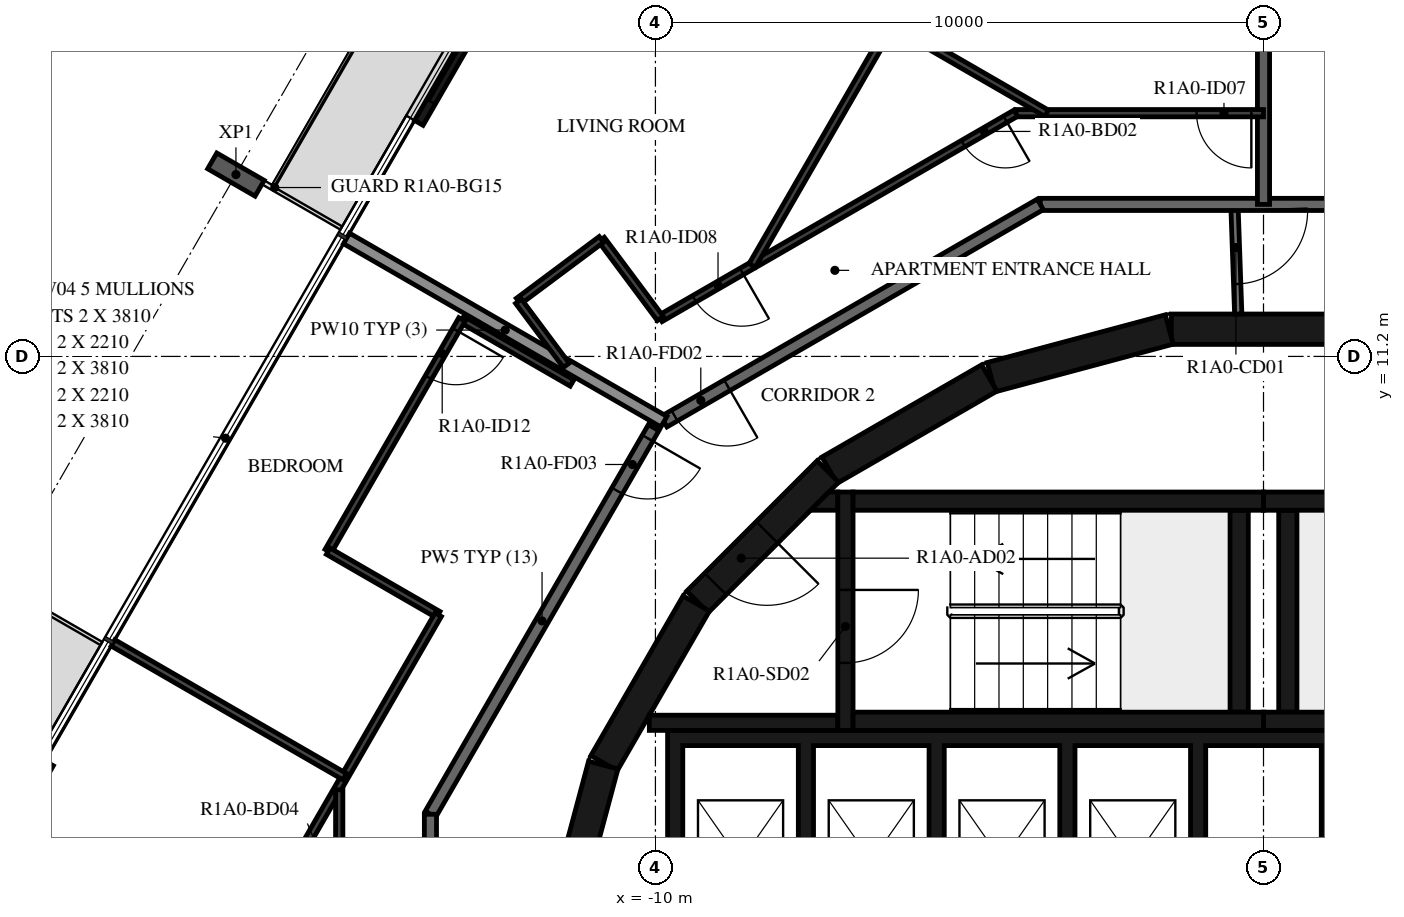
"""IFC4 building model, lengths in metres.
Left out: names, types, materials, properties, quantities, classifications, styles, units other than length and angle.
Written with IfcOpenShell. Run it as: python <this file> out.ifc"""

import sys

from ifc_helpers import new_model, si_unit, direction, frame, frame_2d, origin, origin_2d, place, context, subcontext, project, spatial, polyline, rectangle, i_section, outline, extrude, element, fill, save


model = new_model("IFC4")
c1 = context("Model", 3, precision=1e-05, world=origin(), true_north=direction((0.0, 1.0)))
c2 = subcontext(c1, "Body", "Model", "MODEL_VIEW")
j1 = project(units=[si_unit("LENGTHUNIT", "METRE"), si_unit("PLANEANGLEUNIT", "RADIAN")], contexts=[c1])
p1 = place(None, origin())
s1 = spatial("IfcSite", under=j1, at=p1, CompositionType="ELEMENT")
p2 = place(p1, origin())
s2 = spatial("IfcBuilding", under=s1, at=p2, CompositionType="ELEMENT")
p3 = place(p2, frame((0.0, 0.0, 45.4)))
s3 = spatial("IfcBuildingStorey", under=s2, at=p3, CompositionType="ELEMENT", Elevation=45.4)
p4 = place(p3, frame((-16.899, 14.19, -0.38), z_axis=(0.0, 0.0, 1.0), x_axis=(0.50000017485, 0.866025302835, 0.0)))
e1 = element("IfcColumn", 1, at=p4, inside=s3, PredefinedType="COLUMN", context=c2, shape_type="SweptSolid", body=[
    extrude(i_section(OverallWidth=0.3, OverallDepth=0.9, WebThickness=0.019, FlangeThickness=0.035, FilletRadius=0.03, at=origin_2d()), origin(), (0.0, 0.0, 1.0), 3.5),
])
p5 = place(p3, frame((-12.291, 17.812, 0.0), z_axis=(0.0, 0.0, 1.0), x_axis=(-0.499971222258, -0.866042017984, 0.0)))
e2 = element("IfcWall", 2, at=p5, inside=s3, PredefinedType="STANDARD", context=c2, shape_type="SweptSolid", body=[
    extrude(rectangle(XDim=3.2, YDim=0.16, at=frame_2d((1.6, 0.0))), origin(), (0.0, 0.0, 1.0), 3.12),
])
p6 = place(p5, frame((0.4, 0.0, 0.0)))
e3 = element("IfcOpeningElement", 3, at=p6, cuts=e2, PredefinedType="OPENING", context=c2, shape_type="SweptSolid", body=[
    extrude(rectangle(XDim=2.4, YDim=2.4, at=frame_2d((1.2, 1.2))), frame((0.0, 0.09, 0.0), z_axis=(0.0, -1.0, 0.0), x_axis=(1.0, 0.0, 0.0)), (0.0, 0.0, 1.0), 0.18),
])
p7 = place(p3, frame((-19.971, 4.51, 0.0), z_axis=(0.0, 0.0, 1.0), x_axis=(-0.500028443584, -0.866008981251, 0.0)))
e4 = element("IfcWall", 4, at=p7, inside=s3, PredefinedType="STANDARD", context=c2, shape_type="SweptSolid", body=[
    extrude(rectangle(XDim=3.2, YDim=0.16, at=frame_2d((1.6, 0.0))), origin(), (0.0, 0.0, 1.0), 3.12),
])
p8 = place(p7, frame((0.4, 0.0, 0.0)))
e5 = element("IfcOpeningElement", 5, at=p8, cuts=e4, PredefinedType="OPENING", context=c2, shape_type="SweptSolid", body=[
    extrude(rectangle(XDim=2.4, YDim=2.4, at=frame_2d((1.2, 1.2))), frame((0.0, 0.09, 0.0), z_axis=(0.0, -1.0, 0.0), x_axis=(1.0, 0.0, 0.0)), (0.0, 0.0, 1.0), 0.18),
])
for number, where, z_axis, x_axis in (
    (6, (1.516, 11.647, 0.0), (0.0, 0.0, 1.0), (-1.0, 0.0, 0.0)),
    (7, (-1.55, 11.643, 0.0), (0.0, 0.0, 1.0), (-0.966, -0.259, 0.0)),
    (8, (-4.51, 10.845, 0.0), (0.0, 0.0, 1.0), (-0.866, -0.5, 0.0)),
):
    element("IfcWall", number, at=place(p3, frame(where, z_axis=z_axis, x_axis=x_axis)), inside=s3, PredefinedType="SHEAR", context=c2, shape_type="SweptSolid", body=[
        extrude(rectangle(XDim=3.033, YDim=0.5, at=frame_2d((1.516, 0.0))), origin(), (0.0, 0.0, 1.0), 3.12),
    ])
p9 = place(p3, frame((-7.164, 9.308, 0.0), z_axis=(0.0, 0.0, 1.0), x_axis=(-0.707106781187, -0.707106781187, 0.0)))
e9 = element("IfcWall", 9, at=p9, inside=s3, PredefinedType="SHEAR", context=c2, shape_type="SweptSolid", body=[
    extrude(rectangle(XDim=3.032, YDim=0.5, at=frame_2d((1.516, 0.0))), origin(), (0.0, 0.0, 1.0), 3.12),
])
p10 = place(p9, frame((1.416, 0.0, 0.0)))
e10 = element("IfcOpeningElement", 10, at=p10, cuts=e9, PredefinedType="OPENING", context=c2, shape_type="SweptSolid", body=[
    extrude(rectangle(XDim=1.2, YDim=2.1, at=frame_2d((0.6, 1.05))), frame((0.0, 0.26, 0.0), z_axis=(0.0, -1.0, 0.0), x_axis=(1.0, 0.0, 0.0)), (0.0, 0.0, 1.0), 0.52),
])
for number, where, z_axis, x_axis in (
    (11, (-9.329, 7.137, 0.0), (0.0, 0.0, 1.0), (-0.5, -0.866, 0.0)),
    (12, (-10.858, 4.479, 0.0), (0.0, 0.0, 1.0), (-0.259, -0.966, 0.0)),
):
    element("IfcWall", number, at=place(p3, frame(where, z_axis=z_axis, x_axis=x_axis)), inside=s3, PredefinedType="SHEAR", context=c2, shape_type="SweptSolid", body=[
        extrude(rectangle(XDim=3.033, YDim=0.5, at=frame_2d((1.516, 0.0))), origin(), (0.0, 0.0, 1.0), 3.12),
    ])
for number, where, z_axis, x_axis in (
    (13, (0.0, 5.2, 0.0), (0.0, 0.0, 1.0), (1.0, 0.0, 0.0)),
    (14, (0.0, 8.82, 0.0), (0.0, 0.0, 1.0), (1.0, 0.0, 0.0)),
):
    element("IfcWall", number, at=place(p3, frame(where, z_axis=z_axis, x_axis=x_axis)), inside=s3, PredefinedType="SHEAR", context=c2, shape_type="SweptSolid", body=[
        extrude(rectangle(XDim=6.75, YDim=0.3, at=frame_2d((3.375, 0.0))), origin(), (0.0, 0.0, 1.0), 3.12),
    ])
p11 = place(p3, frame((0.4, 5.35, 0.0), z_axis=(0.0, 0.0, 1.0), x_axis=(0.0, 1.0, 0.0)))
e15 = element("IfcWall", 15, at=p11, inside=s3, PredefinedType="SHEAR", context=c2, shape_type="SweptSolid", body=[
    extrude(rectangle(XDim=3.32, YDim=0.3, at=frame_2d((1.66, 0.0))), origin(), (0.0, 0.0, 1.0), 3.12),
])
for number, where, z_axis, x_axis in (
    (16, (-6.75, 5.2, 0.0), (0.0, 0.0, 1.0), (1.0, 0.0, 0.0)),
    (17, (-6.75, 8.82, 0.0), (0.0, 0.0, 1.0), (1.0, 0.0, 0.0)),
):
    element("IfcWall", number, at=place(p3, frame(where, z_axis=z_axis, x_axis=x_axis)), inside=s3, PredefinedType="SHEAR", context=c2, shape_type="SweptSolid", body=[
        extrude(rectangle(XDim=6.75, YDim=0.3, at=frame_2d((3.375, 0.0))), origin(), (0.0, 0.0, 1.0), 3.12),
    ])
p12 = place(p3, frame((-0.4, 5.35, 0.0), z_axis=(0.0, 0.0, 1.0), x_axis=(0.0, 1.0, 0.0)))
e18 = element("IfcWall", 18, at=p12, inside=s3, PredefinedType="SHEAR", context=c2, shape_type="SweptSolid", body=[
    extrude(rectangle(XDim=3.32, YDim=0.3, at=frame_2d((1.66, 0.0))), origin(), (0.0, 0.0, 1.0), 3.12),
])
p13 = place(p3, frame((-6.875, 8.97, 0.0), z_axis=(0.0, 0.0, 1.0), x_axis=(0.0, -1.0, 0.0)))
e19 = element("IfcWall", 19, at=p13, inside=s3, PredefinedType="SHEAR", context=c2, shape_type="SweptSolid", body=[
    extrude(rectangle(XDim=3.92, YDim=0.25, at=frame_2d((1.96, 0.0))), origin(), (0.0, 0.0, 1.0), 3.12),
])
p14 = place(p13, frame((1.61, 0.0, 0.0)))
e20 = element("IfcOpeningElement", 20, at=p14, cuts=e19, PredefinedType="OPENING", context=c2, shape_type="SweptSolid", body=[
    extrude(rectangle(XDim=1.2, YDim=2.1, at=frame_2d((0.6, 1.05))), frame((0.0, 0.135, 0.0), z_axis=(0.0, -1.0, 0.0), x_axis=(1.0, 0.0, 0.0)), (0.0, 0.0, 1.0), 0.27),
])
p15 = place(p3, frame((-7.0, 5.175, 0.0), z_axis=(0.0, 0.0, 1.0), x_axis=(-1.0, 0.0, 0.0)))
e21 = element("IfcWall", 21, at=p15, inside=s3, PredefinedType="SHEAR", context=c2, shape_type="SweptSolid", body=[
    extrude(rectangle(XDim=3.1, YDim=0.25, at=frame_2d((1.55, 0.0))), origin(), (0.0, 0.0, 1.0), 3.12),
])
p16 = place(p3, origin())
e22 = element("IfcWall", 22, at=p16, inside=s3, PredefinedType="SHEAR", context=c2, shape_type="SweptSolid", body=[
    extrude(outline(polyline([(-7.148, 8.97), (-7.0, 8.97), (-7.0, 8.67), (-7.448, 8.67), (-7.148, 8.97)])), origin(), (0.0, 0.0, 1.0), 3.12),
])
p17 = place(p3, origin())
e23 = element("IfcWall", 23, at=p17, inside=s3, PredefinedType="SHEAR", context=c2, shape_type="SweptSolid", body=[
    extrude(outline(polyline([(-9.55, 4.8), (-7.65, 4.8), (-7.65, 1.9), (-7.4, 1.9), (-7.4, 4.8), (-5.5, 4.8), (-5.5, 1.9), (-5.25, 1.9), (-5.25, 4.8), (-3.35, 4.8), (-3.35, 1.9), (-3.1, 1.9), (-3.1, 4.8), (-1.2, 4.8), (-1.2, 1.9), (-0.95, 1.9), (-0.95, 4.8), (0.95, 4.8), (0.95, 1.9), (1.2, 1.9), (1.2, 4.8), (3.1, 4.8), (3.1, 1.9), (3.35, 1.9), (3.35, 4.8), (5.25, 4.8), (5.25, 1.9), (5.5, 1.9), (5.5, 4.8), (7.4, 4.8), (7.4, 1.9), (7.65, 1.9), (7.65, 4.8), (9.55, 4.8), (9.55, 1.9), (9.8, 1.9), (9.8, 4.8), (9.8, 5.05), (-9.8, 5.05), (-9.8, 4.8), (-9.8, 1.9), (-9.55, 1.9), (-9.55, 4.8)])), origin(), (0.0, 0.0, 1.0), 3.12),
])
p18 = place(p3, frame((-0.479, 13.7, 0.0), z_axis=(0.0, 0.0, 1.0), x_axis=(0.034919103017, -0.999390142159, 0.0)))
e24 = element("IfcWall", 24, at=p18, inside=s3, PredefinedType="PARTITIONING", context=c2, shape_type="SweptSolid", body=[
    extrude(rectangle(XDim=1.804, YDim=0.12, at=frame_2d((0.902, 0.0))), origin(), (0.0, 0.0, 1.0), 3.12),
])
p19 = place(p18, frame((0.11, 0.0, 0.0)))
e25 = element("IfcOpeningElement", 25, at=p19, cuts=e24, PredefinedType="OPENING", context=c2, shape_type="SweptSolid", body=[
    extrude(rectangle(XDim=1.2, YDim=2.1, at=frame_2d((0.6, 1.05))), frame((0.0, 0.07, 0.0), z_axis=(0.0, -1.0, 0.0), x_axis=(1.0, 0.0, 0.0)), (0.0, 0.0, 1.0), 0.14),
])
p20 = place(p3, frame((3.671, 13.7, 0.0), z_axis=(0.0, 0.0, 1.0), x_axis=(-1.0, 0.0, 0.0)))
e26 = element("IfcWall", 26, at=p20, inside=s3, PredefinedType="STANDARD", context=c2, shape_type="SweptSolid", body=[
    extrude(rectangle(XDim=7.342, YDim=0.2, at=frame_2d((3.671, 0.0))), origin(), (0.0, 0.0, 1.0), 3.12),
])
p21 = place(p3, frame((-3.671, 13.7, 0.0), z_axis=(0.0, 0.0, 1.0), x_axis=(-0.866031419417, -0.499989580474, 0.0)))
e27 = element("IfcWall", 27, at=p21, inside=s3, PredefinedType="STANDARD", context=c2, shape_type="SweptSolid", body=[
    extrude(rectangle(XDim=7.147, YDim=0.2, at=frame_2d((3.573, 0.0))), origin(), (0.0, 0.0, 1.0), 3.12),
])
p22 = place(p21, frame((5.947, 0.0, 0.0)))
e28 = element("IfcOpeningElement", 28, at=p22, cuts=e27, PredefinedType="OPENING", context=c2, shape_type="SweptSolid", body=[
    extrude(rectangle(XDim=1.0, YDim=2.1, at=frame_2d((0.5, 1.05))), frame((0.0, 0.11, 0.0), z_axis=(0.0, -1.0, 0.0), x_axis=(1.0, 0.0, 0.0)), (0.0, 0.0, 1.0), 0.22),
])
p23 = place(p3, frame((-10.029, 10.029, 0.0), z_axis=(0.0, 0.0, 1.0), x_axis=(-0.500001669485, -0.866024439905, 0.0)))
e29 = element("IfcWall", 29, at=p23, inside=s3, PredefinedType="STANDARD", context=c2, shape_type="SweptSolid", body=[
    extrude(rectangle(XDim=7.342, YDim=0.2, at=frame_2d((3.671, 0.0))), origin(), (0.0, 0.0, 1.0), 3.12),
])
p24 = place(p23, frame((0.2, 0.0, 0.0)))
e30 = element("IfcOpeningElement", 30, at=p24, cuts=e29, PredefinedType="OPENING", context=c2, shape_type="SweptSolid", body=[
    extrude(rectangle(XDim=1.0, YDim=2.1, at=frame_2d((0.5, 1.05))), frame((0.0, 0.11, 0.0), z_axis=(0.0, -1.0, 0.0), x_axis=(1.0, 0.0, 0.0)), (0.0, 0.0, 1.0), 0.22),
])
p25 = place(p3, frame((-13.7, 3.671, 0.0), z_axis=(0.0, 0.0, 1.0), x_axis=(0.0, -1.0, 0.0)))
e31 = element("IfcWall", 31, at=p25, inside=s3, PredefinedType="STANDARD", context=c2, shape_type="SweptSolid", body=[
    extrude(rectangle(XDim=7.342, YDim=0.2, at=frame_2d((3.671, 0.0))), origin(), (0.0, 0.0, 1.0), 3.12),
])
p26 = place(p3, frame((0.0, 18.437, 0.0), z_axis=(0.0, 0.0, 1.0), x_axis=(0.0, -1.0, 0.0)))
e32 = element("IfcWall", 32, at=p26, inside=s3, PredefinedType="STANDARD", context=c2, shape_type="SweptSolid", body=[
    extrude(rectangle(XDim=4.737, YDim=0.2, at=frame_2d((2.368, 0.0))), origin(), (0.0, 0.0, 1.0), 3.12),
])
p27 = place(p3, frame((-15.08, 13.14, 0.0), z_axis=(0.0, 0.0, 1.0), x_axis=(0.86603112331, -0.49999009336, 0.0)))
e33 = element("IfcWall", 33, at=p27, inside=s3, PredefinedType="STANDARD", context=c2, shape_type="SweptSolid", body=[
    extrude(rectangle(XDim=6.027, YDim=0.2, at=frame_2d((3.014, 0.0))), origin(), (0.0, 0.0, 1.0), 2.73),
])
p28 = place(p3, frame((0.0, 15.2, 0.0), z_axis=(0.0, 0.0, 1.0), x_axis=(-1.0, 0.0, 0.0)))
e34 = element("IfcWall", 34, at=p28, inside=s3, PredefinedType="PARTITIONING", context=c2, shape_type="SweptSolid", body=[
    extrude(rectangle(XDim=4.073, YDim=0.12, at=frame_2d((2.036, 0.0))), origin(), (0.0, 0.0, 1.0), 3.12),
])
p29 = place(p28, frame((0.2, 0.0, 0.0)))
e35 = element("IfcOpeningElement", 35, at=p29, cuts=e34, PredefinedType="OPENING", context=c2, shape_type="SweptSolid", body=[
    extrude(rectangle(XDim=0.9, YDim=2.1, at=frame_2d((0.45, 1.05))), frame((0.0, 0.07, 0.0), z_axis=(0.0, -1.0, 0.0), x_axis=(1.0, 0.0, 0.0)), (0.0, 0.0, 1.0), 0.14),
])
p30 = place(p3, frame((-4.073, 15.2, 0.0), z_axis=(0.0, 0.0, 1.0), x_axis=(-0.866024802457, -0.500001041529, 0.0)))
e36 = element("IfcWall", 36, at=p30, inside=s3, PredefinedType="PARTITIONING", context=c2, shape_type="SweptSolid", body=[
    extrude(rectangle(XDim=6.751, YDim=0.12, at=frame_2d((3.376, 0.0))), origin(), (0.0, 0.0, 1.0), 3.12),
])
p31 = place(p30, frame((0.2, 0.0, 0.0)))
e37 = element("IfcOpeningElement", 37, at=p31, cuts=e36, PredefinedType="OPENING", context=c2, shape_type="SweptSolid", body=[
    extrude(rectangle(XDim=0.8, YDim=2.1, at=frame_2d((0.4, 1.05))), frame((0.0, 0.07, 0.0), z_axis=(0.0, -1.0, 0.0), x_axis=(1.0, 0.0, 0.0)), (0.0, 0.0, 1.0), 0.14),
])
p32 = place(p30, frame((5.206, 0.0, 0.0)))
e38 = element("IfcOpeningElement", 38, at=p32, cuts=e36, PredefinedType="OPENING", context=c2, shape_type="SweptSolid", body=[
    extrude(rectangle(XDim=0.9, YDim=2.1, at=frame_2d((0.45, 1.05))), frame((0.0, 0.07, 0.0), z_axis=(0.0, -1.0, 0.0), x_axis=(1.0, 0.0, 0.0)), (0.0, 0.0, 1.0), 0.14),
])
p33 = place(p3, frame((-9.92, 11.824, 0.0), z_axis=(0.0, 0.0, 1.0), x_axis=(-0.597853402964, 0.801605456921, 0.0)))
e39 = element("IfcWall", 39, at=p33, inside=s3, PredefinedType="PARTITIONING", context=c2, shape_type="SweptSolid", body=[
    extrude(rectangle(XDim=1.621, YDim=0.12, at=frame_2d((0.811, 0.0))), origin(), (0.0, 0.0, 1.0), 3.12),
])
p34 = place(p3, frame((-10.889, 13.124, 0.0), z_axis=(0.0, 0.0, 1.0), x_axis=(-0.801616976804, -0.597837956724, 0.0)))
e40 = element("IfcWall", 40, at=p34, inside=s3, PredefinedType="PARTITIONING", context=c2, shape_type="SweptSolid", body=[
    extrude(rectangle(XDim=1.7, YDim=0.12, at=frame_2d((0.85, 0.0))), origin(), (0.0, 0.0, 1.0), 3.12),
])
p35 = place(p3, frame((-12.252, 12.107, 0.0), z_axis=(0.0, 0.0, 1.0), x_axis=(0.597827926538, -0.801624457119, 0.0)))
e41 = element("IfcWall", 41, at=p35, inside=s3, PredefinedType="PARTITIONING", context=c2, shape_type="SweptSolid", body=[
    extrude(rectangle(XDim=1.314, YDim=0.12, at=frame_2d((0.657, 0.0))), origin(), (0.0, 0.0, 1.0), 3.12),
])
p36 = place(p3, frame((-6.114, 16.67, 0.0), z_axis=(0.0, 0.0, 1.0), x_axis=(0.866011328839, -0.500024377727, 0.0)))
e42 = element("IfcWall", 42, at=p36, inside=s3, PredefinedType="PARTITIONING", context=c2, shape_type="SweptSolid", body=[
    extrude(rectangle(XDim=2.94, YDim=0.12, at=frame_2d((1.47, 0.0))), origin(), (0.0, 0.0, 1.0), 3.12),
])
p37 = place(p3, frame((-6.094, 16.705, 0.0), z_axis=(0.0, 0.0, 1.0), x_axis=(-0.500014747178, -0.86601688933, 0.0)))
e43 = element("IfcWall", 43, at=p37, inside=s3, PredefinedType="PARTITIONING", context=c2, shape_type="SweptSolid", body=[
    extrude(rectangle(XDim=4.627, YDim=0.12, at=frame_2d((2.313, 0.0))), origin(), (0.0, 0.0, 1.0), 3.12),
])
p38 = place(p3, frame((-11.372, 10.763, 0.0), z_axis=(0.0, 0.0, 1.0), x_axis=(-0.866041603473, 0.499971940267, 0.0)))
e44 = element("IfcWall", 44, at=p38, inside=s3, PredefinedType="PARTITIONING", context=c2, shape_type="SweptSolid", body=[
    extrude(rectangle(XDim=2.089, YDim=0.12, at=frame_2d((1.045, 0.0))), origin(), (0.0, 0.0, 1.0), 3.12),
])
p39 = place(p3, frame((-13.181, 11.808, 0.0), z_axis=(0.0, 0.0, 1.0), x_axis=(-0.50002983664, -0.866008176907, 0.0)))
e45 = element("IfcWall", 45, at=p39, inside=s3, PredefinedType="PARTITIONING", context=c2, shape_type="SweptSolid", body=[
    extrude(rectangle(XDim=4.4, YDim=0.12, at=frame_2d((2.2, 0.0))), origin(), (0.0, 0.0, 1.0), 3.12),
])
p40 = place(p39, frame((0.2, 0.0, 0.0)))
e46 = element("IfcOpeningElement", 46, at=p40, cuts=e45, PredefinedType="OPENING", context=c2, shape_type="SweptSolid", body=[
    extrude(rectangle(XDim=0.9, YDim=2.1, at=frame_2d((0.45, 1.05))), frame((0.0, 0.07, 0.0), z_axis=(0.0, -1.0, 0.0), x_axis=(1.0, 0.0, 0.0)), (0.0, 0.0, 1.0), 0.14),
])
p41 = place(p3, frame((-15.382, 7.997, 0.0), z_axis=(0.0, 0.0, 1.0), x_axis=(0.866041603473, -0.499971940267, 0.0)))
e47 = element("IfcWall", 47, at=p41, inside=s3, PredefinedType="PARTITIONING", context=c2, shape_type="SweptSolid", body=[
    extrude(rectangle(XDim=2.089, YDim=0.12, at=frame_2d((1.045, 0.0))), origin(), (0.0, 0.0, 1.0), 3.12),
])
p42 = place(p3, frame((-13.572, 6.953, 0.0), z_axis=(0.0, 0.0, 1.0), x_axis=(-0.499981332661, -0.866036181109, 0.0)))
e48 = element("IfcWall", 48, at=p42, inside=s3, PredefinedType="PARTITIONING", context=c2, shape_type="SweptSolid", body=[
    extrude(rectangle(XDim=7.483, YDim=0.12, at=frame_2d((3.742, 0.0))), origin(), (0.0, 0.0, 1.0), 3.12),
])
p43 = place(p3, frame((-15.2, 4.073, 0.0), z_axis=(0.0, 0.0, 1.0), x_axis=(0.0, -1.0, 0.0)))
e49 = element("IfcWall", 49, at=p43, inside=s3, PredefinedType="PARTITIONING", context=c2, shape_type="SweptSolid", body=[
    extrude(rectangle(XDim=4.821, YDim=0.12, at=frame_2d((2.411, 0.0))), origin(), (0.0, 0.0, 1.0), 3.12),
])
p44 = place(p43, frame((1.4, 0.0, 0.0)))
e50 = element("IfcOpeningElement", 50, at=p44, cuts=e49, PredefinedType="OPENING", context=c2, shape_type="SweptSolid", body=[
    extrude(rectangle(XDim=0.8, YDim=2.1, at=frame_2d((0.4, 1.05))), frame((0.0, 0.07, 0.0), z_axis=(0.0, -1.0, 0.0), x_axis=(1.0, 0.0, 0.0)), (0.0, 0.0, 1.0), 0.14),
])
p45 = place(p3, frame((-18.92, 6.49, 0.0), z_axis=(0.0, 0.0, 1.0), x_axis=(0.865994303029, -0.500053864221, 0.0)))
e51 = element("IfcWall", 51, at=p45, inside=s3, PredefinedType="PARTITIONING", context=c2, shape_type="SweptSolid", body=[
    extrude(rectangle(XDim=4.4, YDim=0.12, at=frame_2d((2.2, 0.0))), origin(), (0.0, 0.0, 1.0), 2.73),
])
p46 = place(p6, origin())
e52 = element("IfcDoor", 52, at=p46, inside=s3, OperationType="DOUBLE_DOOR_SLIDING", PredefinedType="DOOR", context=c2, shape_type="SweptSolid", body=[
    extrude(rectangle(XDim=2.4, YDim=2.4, at=frame_2d((1.2, 1.2))), frame((0.0, 0.025, 0.0), z_axis=(0.0, -1.0, 0.0), x_axis=(1.0, 0.0, 0.0)), (0.0, 0.0, 1.0), 0.05),
])
fill(e3, e52)
p47 = place(p14, origin())
e53 = element("IfcDoor", 53, at=p47, inside=s3, OperationType="SINGLE_SWING_LEFT", PredefinedType="DOOR", context=c2, shape_type="SweptSolid", body=[
    extrude(rectangle(XDim=1.2, YDim=2.1, at=frame_2d((0.6, 1.05))), frame((0.0, 0.025, 0.0), z_axis=(0.0, -1.0, 0.0), x_axis=(1.0, 0.0, 0.0)), (0.0, 0.0, 1.0), 0.05),
])
fill(e20, e53)
p48 = place(p10, origin())
e54 = element("IfcDoor", 54, at=p48, inside=s3, OperationType="SINGLE_SWING_RIGHT", PredefinedType="DOOR", context=c2, shape_type="SweptSolid", body=[
    extrude(rectangle(XDim=1.2, YDim=2.1, at=frame_2d((0.6, 1.05))), frame((0.0, 0.025, 0.0), z_axis=(0.0, -1.0, 0.0), x_axis=(1.0, 0.0, 0.0)), (0.0, 0.0, 1.0), 0.05),
])
fill(e10, e54)
p49 = place(p22, origin())
e55 = element("IfcDoor", 55, at=p49, inside=s3, OperationType="SINGLE_SWING_LEFT", PredefinedType="DOOR", context=c2, shape_type="SweptSolid", body=[
    extrude(rectangle(XDim=1.0, YDim=2.1, at=frame_2d((0.5, 1.05))), frame((0.0, 0.025, 0.0), z_axis=(0.0, -1.0, 0.0), x_axis=(1.0, 0.0, 0.0)), (0.0, 0.0, 1.0), 0.05),
])
fill(e28, e55)
p50 = place(p29, origin())
e56 = element("IfcDoor", 56, at=p50, inside=s3, OperationType="SINGLE_SWING_RIGHT", PredefinedType="DOOR", context=c2, shape_type="SweptSolid", body=[
    extrude(rectangle(XDim=0.9, YDim=2.1, at=frame_2d((0.45, 1.05))), frame((0.0, 0.025, 0.0), z_axis=(0.0, -1.0, 0.0), x_axis=(1.0, 0.0, 0.0)), (0.0, 0.0, 1.0), 0.05),
])
fill(e35, e56)
p51 = place(p31, origin())
e57 = element("IfcDoor", 57, at=p51, inside=s3, OperationType="SINGLE_SWING_LEFT", PredefinedType="DOOR", context=c2, shape_type="SweptSolid", body=[
    extrude(rectangle(XDim=0.8, YDim=2.1, at=frame_2d((0.4, 1.05))), frame((0.0, 0.025, 0.0), z_axis=(0.0, -1.0, 0.0), x_axis=(1.0, 0.0, 0.0)), (0.0, 0.0, 1.0), 0.05),
])
fill(e37, e57)
p52 = place(p32, origin())
e58 = element("IfcDoor", 58, at=p52, inside=s3, OperationType="SINGLE_SWING_LEFT", PredefinedType="DOOR", context=c2, shape_type="SweptSolid", body=[
    extrude(rectangle(XDim=0.9, YDim=2.1, at=frame_2d((0.45, 1.05))), frame((0.0, 0.025, 0.0), z_axis=(0.0, -1.0, 0.0), x_axis=(1.0, 0.0, 0.0)), (0.0, 0.0, 1.0), 0.05),
])
fill(e38, e58)
p53 = place(p24, origin())
e59 = element("IfcDoor", 59, at=p53, inside=s3, OperationType="SINGLE_SWING_LEFT", PredefinedType="DOOR", context=c2, shape_type="SweptSolid", body=[
    extrude(rectangle(XDim=1.0, YDim=2.1, at=frame_2d((0.5, 1.05))), frame((0.0, 0.025, 0.0), z_axis=(0.0, -1.0, 0.0), x_axis=(1.0, 0.0, 0.0)), (0.0, 0.0, 1.0), 0.05),
])
fill(e30, e59)
p54 = place(p40, origin())
e60 = element("IfcDoor", 60, at=p54, inside=s3, OperationType="SINGLE_SWING_LEFT", PredefinedType="DOOR", context=c2, shape_type="SweptSolid", body=[
    extrude(rectangle(XDim=0.9, YDim=2.1, at=frame_2d((0.45, 1.05))), frame((0.0, 0.025, 0.0), z_axis=(0.0, -1.0, 0.0), x_axis=(1.0, 0.0, 0.0)), (0.0, 0.0, 1.0), 0.05),
])
fill(e46, e60)
p55 = place(p19, origin())
e61 = element("IfcDoor", 61, at=p55, inside=s3, OperationType="DOUBLE_DOOR_SINGLE_SWING", PredefinedType="DOOR", context=c2, shape_type="SweptSolid", body=[
    extrude(rectangle(XDim=1.2, YDim=2.1, at=frame_2d((0.6, 1.05))), frame((0.0, 0.025, 0.0), z_axis=(0.0, -1.0, 0.0), x_axis=(1.0, 0.0, 0.0)), (0.0, 0.0, 1.0), 0.05),
])
fill(e25, e61)
save(model, sys.argv[1])
